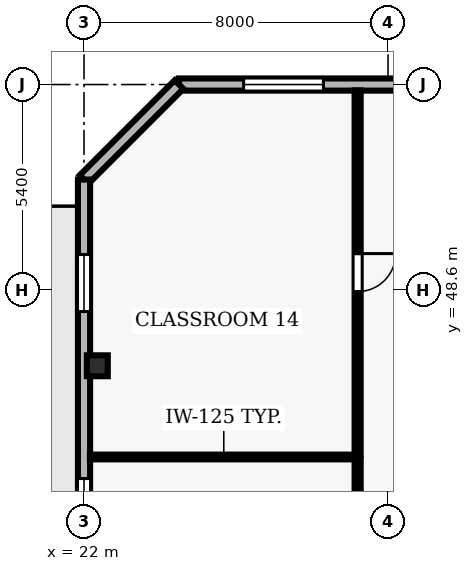
"""IFC4 building model, lengths in metres.
Left out: names, types, materials, properties, quantities, classifications, styles, units other than length and angle.
Written with IfcOpenShell. Run it as: python <this file> out.ifc"""

import sys

from ifc_helpers import new_model, si_unit, direction, frame, frame_2d, origin, origin_2d, place, context, subcontext, project, spatial, rectangle, hollow_rectangle, extrude, element, fill, save


model = new_model("IFC4")
c1 = context("Model", 3, precision=1e-05, world=origin(), true_north=direction((0.0, 1.0)))
c2 = subcontext(c1, "Body", "Model", "MODEL_VIEW")
j1 = project(units=[si_unit("LENGTHUNIT", "METRE"), si_unit("PLANEANGLEUNIT", "RADIAN")], contexts=[c1])
p1 = place(None, origin())
s1 = spatial("IfcSite", under=j1, at=p1, CompositionType="ELEMENT")
p2 = place(p1, origin())
s2 = spatial("IfcBuilding", under=s1, at=p2, CompositionType="ELEMENT")
p3 = place(p2, frame((0.0, 0.0, 26.0)))
s3 = spatial("IfcBuildingStorey", under=s2, at=p3, CompositionType="ELEMENT", Elevation=26.0)
p4 = place(p3, frame((22.35, 46.6, 0.0), z_axis=(0.0, 0.0, 1.0), x_axis=(1.0, 0.0, 0.0)))
e1 = element("IfcColumn", 1, at=p4, inside=s3, PredefinedType="COLUMN", context=c2, shape_type="SweptSolid", body=[
    extrude(hollow_rectangle(XDim=0.55, YDim=0.55, WallThickness=0.025, at=origin_2d()), origin(), (0.0, 0.0, 1.0), 5.0),
])
p5 = place(p3, frame((35.5, 54.0, 0.0), z_axis=(0.0, 0.0, 1.0), x_axis=(-1.0, 0.0, 0.0)))
e2 = element("IfcWall", 2, at=p5, inside=s3, PredefinedType="SOLIDWALL", context=c2, shape_type="SweptSolid", body=[
    extrude(rectangle(XDim=11.0, YDim=0.32, at=frame_2d((5.5, 0.0))), origin(), (0.0, 0.0, 1.0), 4.79),
])
p6 = place(p5, frame((1.25, 0.0, 0.9)))
e3 = element("IfcOpeningElement", 3, at=p6, cuts=e2, PredefinedType="OPENING", context=c2, shape_type="SweptSolid", body=[
    extrude(rectangle(XDim=2.1, YDim=1.6, at=frame_2d((1.05, 0.8))), frame((0.0, 0.17, 0.0), z_axis=(0.0, -1.0, 0.0), x_axis=(1.0, 0.0, 0.0)), (0.0, 0.0, 1.0), 0.34),
])
p7 = place(p5, frame((7.2, 0.0, 0.9)))
e4 = element("IfcOpeningElement", 4, at=p7, cuts=e2, PredefinedType="OPENING", context=c2, shape_type="SweptSolid", body=[
    extrude(rectangle(XDim=2.1, YDim=1.6, at=frame_2d((1.05, 0.8))), frame((0.0, 0.17, 0.0), z_axis=(0.0, -1.0, 0.0), x_axis=(1.0, 0.0, 0.0)), (0.0, 0.0, 1.0), 0.34),
])
p8 = place(p3, frame((24.5, 54.0, 0.0), z_axis=(0.0, 0.0, 1.0), x_axis=(-0.707106781187, -0.707106781187, 0.0)))
e5 = element("IfcWall", 5, at=p8, inside=s3, PredefinedType="SOLIDWALL", context=c2, shape_type="SweptSolid", body=[
    extrude(rectangle(XDim=3.536, YDim=0.32, at=frame_2d((1.768, 0.0))), origin(), (0.0, 0.0, 1.0), 4.79),
])
p9 = place(p3, frame((22.0, 51.5, 0.0), z_axis=(0.0, 0.0, 1.0), x_axis=(0.0, -1.0, 0.0)))
e6 = element("IfcWall", 6, at=p9, inside=s3, PredefinedType="SOLIDWALL", context=c2, shape_type="SweptSolid", body=[
    extrude(rectangle(XDim=49.0, YDim=0.32, at=frame_2d((24.5, 0.0))), origin(), (0.0, 0.0, 1.0), 4.79),
])
p10 = place(p9, frame((12.1, 0.0, 0.0)))
e7 = element("IfcOpeningElement", 7, at=p10, cuts=e6, PredefinedType="OPENING", context=c2, shape_type="SweptSolid", body=[
    extrude(rectangle(XDim=1.0, YDim=2.2, at=frame_2d((0.5, 1.1))), frame((0.0, 0.17, 0.0), z_axis=(0.0, -1.0, 0.0), x_axis=(1.0, 0.0, 0.0)), (0.0, 0.0, 1.0), 0.34),
])
p11 = place(p9, frame((1.972, 0.0, 0.9)))
e8 = element("IfcOpeningElement", 8, at=p11, cuts=e6, PredefinedType="OPENING", context=c2, shape_type="SweptSolid", body=[
    extrude(rectangle(XDim=1.5, YDim=1.8, at=frame_2d((0.75, 0.9))), frame((0.0, 0.17, 0.0), z_axis=(0.0, -1.0, 0.0), x_axis=(1.0, 0.0, 0.0)), (0.0, 0.0, 1.0), 0.34),
])
p12 = place(p9, frame((7.867, 0.0, 0.9)))
e9 = element("IfcOpeningElement", 9, at=p12, cuts=e6, PredefinedType="OPENING", context=c2, shape_type="SweptSolid", body=[
    extrude(rectangle(XDim=1.5, YDim=1.8, at=frame_2d((0.75, 0.9))), frame((0.0, 0.17, 0.0), z_axis=(0.0, -1.0, 0.0), x_axis=(1.0, 0.0, 0.0)), (0.0, 0.0, 1.0), 0.34),
])
p13 = place(p9, frame((18.306, 0.0, 0.9)))
e10 = element("IfcOpeningElement", 10, at=p13, cuts=e6, PredefinedType="OPENING", context=c2, shape_type="SweptSolid", body=[
    extrude(rectangle(XDim=1.5, YDim=1.8, at=frame_2d((0.75, 0.9))), frame((0.0, 0.17, 0.0), z_axis=(0.0, -1.0, 0.0), x_axis=(1.0, 0.0, 0.0)), (0.0, 0.0, 1.0), 0.34),
])
p14 = place(p9, frame((23.3, 0.0, 0.9)))
e11 = element("IfcOpeningElement", 11, at=p14, cuts=e6, PredefinedType="OPENING", context=c2, shape_type="SweptSolid", body=[
    extrude(rectangle(XDim=1.5, YDim=1.8, at=frame_2d((0.75, 0.9))), frame((0.0, 0.17, 0.0), z_axis=(0.0, -1.0, 0.0), x_axis=(1.0, 0.0, 0.0)), (0.0, 0.0, 1.0), 0.34),
])
p15 = place(p9, frame((29.194, 0.0, 0.9)))
e12 = element("IfcOpeningElement", 12, at=p15, cuts=e6, PredefinedType="OPENING", context=c2, shape_type="SweptSolid", body=[
    extrude(rectangle(XDim=1.5, YDim=1.8, at=frame_2d((0.75, 0.9))), frame((0.0, 0.17, 0.0), z_axis=(0.0, -1.0, 0.0), x_axis=(1.0, 0.0, 0.0)), (0.0, 0.0, 1.0), 0.34),
])
p16 = place(p9, frame((34.189, 0.0, 0.9)))
e13 = element("IfcOpeningElement", 13, at=p16, cuts=e6, PredefinedType="OPENING", context=c2, shape_type="SweptSolid", body=[
    extrude(rectangle(XDim=1.5, YDim=1.8, at=frame_2d((0.75, 0.9))), frame((0.0, 0.17, 0.0), z_axis=(0.0, -1.0, 0.0), x_axis=(1.0, 0.0, 0.0)), (0.0, 0.0, 1.0), 0.34),
])
p17 = place(p9, frame((40.083, 0.0, 0.9)))
e14 = element("IfcOpeningElement", 14, at=p17, cuts=e6, PredefinedType="OPENING", context=c2, shape_type="SweptSolid", body=[
    extrude(rectangle(XDim=1.5, YDim=1.8, at=frame_2d((0.75, 0.9))), frame((0.0, 0.17, 0.0), z_axis=(0.0, -1.0, 0.0), x_axis=(1.0, 0.0, 0.0)), (0.0, 0.0, 1.0), 0.34),
])
p18 = place(p3, frame((29.2, 44.2, 0.0), z_axis=(0.0, 0.0, 1.0), x_axis=(-1.0, 0.0, 0.0)))
e15 = element("IfcWall", 15, at=p18, inside=s3, PredefinedType="PARTITIONING", context=c2, shape_type="SweptSolid", body=[
    extrude(rectangle(XDim=7.045, YDim=0.125, at=frame_2d((3.522, 0.0))), origin(), (0.0, 0.0, 1.0), 4.377),
])
p19 = place(p3, frame((29.2, 44.143, 0.0), z_axis=(0.0, 0.0, 1.0), x_axis=(0.0, -1.0, 0.0)))
e16 = element("IfcWall", 16, at=p19, inside=s3, PredefinedType="PARTITIONING", context=c2, shape_type="SweptSolid", body=[
    extrude(rectangle(XDim=9.658, YDim=0.16, at=frame_2d((4.829, 0.0))), origin(), (0.0, 0.0, 1.0), 4.79),
])
p20 = place(p19, frame((4.379, 0.0, 0.0)))
e17 = element("IfcOpeningElement", 17, at=p20, cuts=e16, PredefinedType="OPENING", context=c2, shape_type="SweptSolid", body=[
    extrude(rectangle(XDim=0.9, YDim=2.1, at=frame_2d((0.45, 1.05))), frame((0.0, 0.09, 0.0), z_axis=(0.0, -1.0, 0.0), x_axis=(1.0, 0.0, 0.0)), (0.0, 0.0, 1.0), 0.18),
])
p21 = place(p3, frame((29.2, 53.845, 0.0), z_axis=(0.0, 0.0, 1.0), x_axis=(0.0, -1.0, 0.0)))
e18 = element("IfcWall", 18, at=p21, inside=s3, PredefinedType="PARTITIONING", context=c2, shape_type="SweptSolid", body=[
    extrude(rectangle(XDim=9.587, YDim=0.16, at=frame_2d((4.793, 0.0))), origin(), (0.0, 0.0, 1.0), 4.79),
])
p22 = place(p21, frame((4.293, 0.0, 0.0)))
e19 = element("IfcOpeningElement", 19, at=p22, cuts=e18, PredefinedType="OPENING", context=c2, shape_type="SweptSolid", body=[
    extrude(rectangle(XDim=1.0, YDim=2.1, at=frame_2d((0.5, 1.05))), frame((0.0, 0.09, 0.0), z_axis=(0.0, -1.0, 0.0), x_axis=(1.0, 0.0, 0.0)), (0.0, 0.0, 1.0), 0.18),
])
p23 = place(p7, origin())
e20 = element("IfcWindow", 20, at=p23, inside=s3, PartitioningType="SINGLE_PANEL", PredefinedType="WINDOW", context=c2, shape_type="SweptSolid", body=[
    extrude(rectangle(XDim=2.1, YDim=1.6, at=frame_2d((1.05, 0.8))), frame((0.0, 0.03, 0.0), z_axis=(0.0, -1.0, 0.0), x_axis=(1.0, 0.0, 0.0)), (0.0, 0.0, 1.0), 0.06),
])
fill(e4, e20)
p24 = place(p11, origin())
e21 = element("IfcWindow", 21, at=p24, inside=s3, PartitioningType="SINGLE_PANEL", PredefinedType="WINDOW", context=c2, shape_type="SweptSolid", body=[
    extrude(rectangle(XDim=1.5, YDim=1.8, at=frame_2d((0.75, 0.9))), frame((0.0, 0.03, 0.0), z_axis=(0.0, -1.0, 0.0), x_axis=(1.0, 0.0, 0.0)), (0.0, 0.0, 1.0), 0.06),
])
fill(e8, e21)
p25 = place(p12, origin())
e22 = element("IfcWindow", 22, at=p25, inside=s3, PartitioningType="SINGLE_PANEL", PredefinedType="WINDOW", context=c2, shape_type="SweptSolid", body=[
    extrude(rectangle(XDim=1.5, YDim=1.8, at=frame_2d((0.75, 0.9))), frame((0.0, 0.03, 0.0), z_axis=(0.0, -1.0, 0.0), x_axis=(1.0, 0.0, 0.0)), (0.0, 0.0, 1.0), 0.06),
])
fill(e9, e22)
p26 = place(p22, origin())
e23 = element("IfcDoor", 23, at=p26, inside=s3, OperationType="SINGLE_SWING_LEFT", PredefinedType="DOOR", context=c2, shape_type="SweptSolid", body=[
    extrude(rectangle(XDim=1.0, YDim=2.1, at=frame_2d((0.5, 1.05))), frame((0.0, 0.025, 0.0), z_axis=(0.0, -1.0, 0.0), x_axis=(1.0, 0.0, 0.0)), (0.0, 0.0, 1.0), 0.05),
])
fill(e19, e23)
save(model, sys.argv[1])
